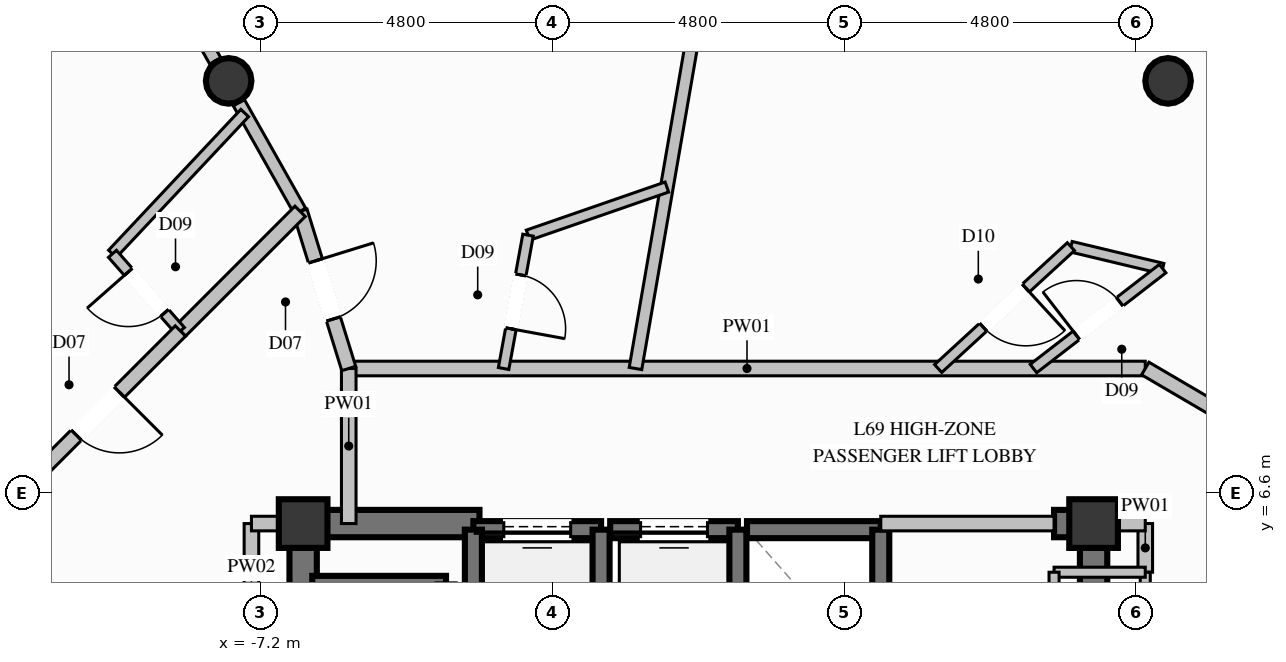
"""IFC4 building model, lengths in metres.
Left out: names, types, materials, properties, quantities, classifications, styles, units other than length and angle.
Written with IfcOpenShell. Run it as: python <this file> out.ifc"""

import sys

from ifc_helpers import new_model, si_unit, direction, frame, frame_2d, origin, origin_2d, place, context, subcontext, project, spatial, rectangle, circle, extrude, element, fill, save


model = new_model("IFC4")
c1 = context("Model", 3, precision=1e-05, world=origin(), true_north=direction((0.0, 1.0)))
c2 = subcontext(c1, "Body", "Model", "MODEL_VIEW")
j1 = project(units=[si_unit("LENGTHUNIT", "METRE"), si_unit("PLANEANGLEUNIT", "RADIAN")], contexts=[c1])
p1 = place(None, origin())
s1 = spatial("IfcSite", under=j1, at=p1, CompositionType="ELEMENT")
p2 = place(p1, origin())
s2 = spatial("IfcBuilding", under=s1, at=p2, CompositionType="ELEMENT")
p3 = place(p2, frame((0.0, 0.0, 266.8)))
s3 = spatial("IfcBuildingStorey", under=s2, at=p3, CompositionType="ELEMENT", Elevation=266.8)
for number, where, z_axis, x_axis in (
    (1, (6.5, 6.1, 0.0), (0.0, 0.0, 1.0), (1.0, 0.0, 0.0)),
    (2, (-6.5, 6.1, 0.0), (0.0, 0.0, 1.0), (1.0, 0.0, 0.0)),
):
    element("IfcColumn", number, at=place(p3, frame(where, z_axis=z_axis, x_axis=x_axis)), inside=s3, PredefinedType="COLUMN", context=c2, shape_type="SweptSolid", body=[
        extrude(rectangle(XDim=0.8, YDim=0.8, at=origin_2d()), origin(), (0.0, 0.0, 1.0), 3.8),
    ])
p4 = place(p3, frame((-6.275, 6.1, 0.0), z_axis=(0.0, 0.0, 1.0), x_axis=(1.0, 0.0, 0.0)))
e3 = element("IfcWall", 3, at=p4, inside=s3, PredefinedType="SHEAR", context=c2, shape_type="SweptSolid", body=[
    extrude(rectangle(XDim=2.675, YDim=0.45, at=frame_2d((1.337, 0.0))), origin(), (0.0, 0.0, 1.0), 3.8),
])
p5 = place(p3, frame((5.85, 6.1, 0.0), z_axis=(0.0, 0.0, 1.0), x_axis=(1.0, 0.0, 0.0)))
e4 = element("IfcWall", 4, at=p5, inside=s3, PredefinedType="SHEAR", context=c2, shape_type="SweptSolid", body=[
    extrude(rectangle(XDim=0.425, YDim=0.45, at=frame_2d((0.212, 0.0))), origin(), (0.0, 0.0, 1.0), 3.8),
])
p6 = place(p3, frame((-6.5, 2.35, 0.0), z_axis=(0.0, 0.0, 1.0), x_axis=(0.0, 1.0, 0.0)))
e5 = element("IfcWall", 5, at=p6, inside=s3, PredefinedType="SHEAR", context=c2, shape_type="SweptSolid", body=[
    extrude(rectangle(XDim=3.975, YDim=0.45, at=frame_2d((1.987, 0.0))), origin(), (0.0, 0.0, 1.0), 3.8),
])
p7 = place(p3, frame((6.5, 3.35, 0.0), z_axis=(0.0, 0.0, 1.0), x_axis=(0.0, 1.0, 0.0)))
e6 = element("IfcWall", 6, at=p7, inside=s3, PredefinedType="SHEAR", context=c2, shape_type="SweptSolid", body=[
    extrude(rectangle(XDim=2.975, YDim=0.45, at=frame_2d((1.487, 0.0))), origin(), (0.0, 0.0, 1.0), 3.8),
])
for number, where, z_axis, x_axis in (
    (7, (7.725, 13.38, 0.0), (0.0, 0.0, 1.0), (1.0, 0.0, 0.0)),
    (8, (-7.725, 13.38, 0.0), (0.0, 0.0, 1.0), (1.0, 0.0, 0.0)),
):
    element("IfcColumn", number, at=place(p3, frame(where, z_axis=z_axis, x_axis=x_axis)), inside=s3, PredefinedType="COLUMN", context=c2, shape_type="SweptSolid", body=[
        extrude(circle(Radius=0.375, at=origin_2d()), origin(), (0.0, 0.0, 1.0), 3.8),
    ])
p8 = place(p3, frame((-1.6, 6.0, 0.0), z_axis=(0.0, 0.0, 1.0), x_axis=(-1.0, 0.0, 0.0)))
e9 = element("IfcWall", 9, at=p8, inside=s3, PredefinedType="SOLIDWALL", context=c2, shape_type="SweptSolid", body=[
    extrude(rectangle(XDim=2.1, YDim=0.28, at=frame_2d((1.05, 0.0))), origin(), (0.0, 0.0, 1.0), 3.57),
])
p9 = place(p8, frame((0.5, 0.0, 0.0)))
e10 = element("IfcOpeningElement", 10, at=p9, cuts=e9, PredefinedType="OPENING", context=c2, shape_type="SweptSolid", body=[
    extrude(rectangle(XDim=1.1, YDim=2.2, at=frame_2d((0.55, 1.1))), frame((0.0, 0.15, 0.0), z_axis=(0.0, -1.0, 0.0), x_axis=(1.0, 0.0, 0.0)), (0.0, 0.0, 1.0), 0.3),
])
for number, where, z_axis, x_axis in (
    (11, (-3.7, 6.0, 0.0), (0.0, 0.0, 1.0), (0.0, -1.0, 0.0)),
    (12, (-1.6, 3.5, 0.0), (0.0, 0.0, 1.0), (0.0, 1.0, 0.0)),
):
    element("IfcWall", number, at=place(p3, frame(where, z_axis=z_axis, x_axis=x_axis)), inside=s3, PredefinedType="SOLIDWALL", context=c2, shape_type="SweptSolid", body=[
        extrude(rectangle(XDim=2.5, YDim=0.28, at=frame_2d((1.25, 0.0))), origin(), (0.0, 0.0, 1.0), 3.57),
    ])
p10 = place(p3, frame((0.65, 6.0, 0.0), z_axis=(0.0, 0.0, 1.0), x_axis=(-1.0, 0.0, 0.0)))
e13 = element("IfcWall", 13, at=p10, inside=s3, PredefinedType="SOLIDWALL", context=c2, shape_type="SweptSolid", body=[
    extrude(rectangle(XDim=2.1, YDim=0.28, at=frame_2d((1.05, 0.0))), origin(), (0.0, 0.0, 1.0), 3.57),
])
p11 = place(p10, frame((0.5, 0.0, 0.0)))
e14 = element("IfcOpeningElement", 14, at=p11, cuts=e13, PredefinedType="OPENING", context=c2, shape_type="SweptSolid", body=[
    extrude(rectangle(XDim=1.1, YDim=2.2, at=frame_2d((0.55, 1.1))), frame((0.0, 0.15, 0.0), z_axis=(0.0, -1.0, 0.0), x_axis=(1.0, 0.0, 0.0)), (0.0, 0.0, 1.0), 0.3),
])
p12 = place(p3, frame((0.65, 3.5, 0.0), z_axis=(0.0, 0.0, 1.0), x_axis=(0.0, 1.0, 0.0)))
e15 = element("IfcWall", 15, at=p12, inside=s3, PredefinedType="SOLIDWALL", context=c2, shape_type="SweptSolid", body=[
    extrude(rectangle(XDim=2.5, YDim=0.28, at=frame_2d((1.25, 0.0))), origin(), (0.0, 0.0, 1.0), 3.57),
])
p13 = place(p3, frame((3.0, 6.0, 0.0), z_axis=(0.0, 0.0, 1.0), x_axis=(-1.0, 0.0, 0.0)))
e16 = element("IfcWall", 16, at=p13, inside=s3, PredefinedType="SOLIDWALL", context=c2, shape_type="SweptSolid", body=[
    extrude(rectangle(XDim=2.2, YDim=0.28, at=frame_2d((1.1, 0.0))), origin(), (0.0, 0.0, 1.0), 3.57),
])
p14 = place(p3, frame((3.0, 3.5, 0.0), z_axis=(0.0, 0.0, 1.0), x_axis=(0.0, 1.0, 0.0)))
e17 = element("IfcWall", 17, at=p14, inside=s3, PredefinedType="SOLIDWALL", context=c2, shape_type="SweptSolid", body=[
    extrude(rectangle(XDim=2.5, YDim=0.28, at=frame_2d((1.25, 0.0))), origin(), (0.0, 0.0, 1.0), 3.57),
])
p15 = place(p3, frame((-4.15, 5.1, 0.0), z_axis=(0.0, 0.0, 1.0), x_axis=(-1.0, 0.0, 0.0)))
e18 = element("IfcWall", 18, at=p15, inside=s3, PredefinedType="SOLIDWALL", context=c2, shape_type="SweptSolid", body=[
    extrude(rectangle(XDim=2.2, YDim=0.28, at=frame_2d((1.1, 0.0))), origin(), (0.0, 0.0, 1.0), 3.57),
])
p16 = place(p3, frame((-5.75, 8.65, 0.0), z_axis=(0.0, 0.0, 1.0), x_axis=(1.0, 0.0, 0.0)))
e19 = element("IfcWall", 19, at=p16, inside=s3, PredefinedType="PARTITIONING", context=c2, shape_type="SweptSolid", body=[
    extrude(rectangle(XDim=13.1, YDim=0.24, at=frame_2d((6.55, 0.0))), origin(), (0.0, 0.0, 1.0), 3.57),
])
p17 = place(p3, frame((3.0, 6.1, 0.0), z_axis=(0.0, 0.0, 1.0), x_axis=(1.0, 0.0, 0.0)))
e20 = element("IfcWall", 20, at=p17, inside=s3, PredefinedType="PARTITIONING", context=c2, shape_type="SweptSolid", body=[
    extrude(rectangle(XDim=2.85, YDim=0.24, at=frame_2d((1.425, 0.0))), origin(), (0.0, 0.0, 1.0), 2.655),
])
p18 = place(p3, frame((7.35, 5.3, 0.0), z_axis=(0.0, 0.0, 1.0), x_axis=(0.0, 1.0, 0.0)))
e21 = element("IfcWall", 21, at=p18, inside=s3, PredefinedType="PARTITIONING", context=c2, shape_type="SweptSolid", body=[
    extrude(rectangle(XDim=0.8, YDim=0.24, at=frame_2d((0.4, 0.0))), origin(), (0.0, 0.0, 1.0), 2.655),
])
p19 = place(p3, frame((6.5, 6.1, 0.0), z_axis=(0.0, 0.0, 1.0), x_axis=(1.0, 0.0, 0.0)))
e22 = element("IfcWall", 22, at=p19, inside=s3, PredefinedType="PARTITIONING", context=c2, shape_type="SweptSolid", body=[
    extrude(rectangle(XDim=0.85, YDim=0.24, at=frame_2d((0.425, 0.0))), origin(), (0.0, 0.0, 1.0), 3.085),
])
p20 = place(p3, frame((-5.75, 6.1, 0.0), z_axis=(0.0, 0.0, 1.0), x_axis=(0.0, 1.0, 0.0)))
e23 = element("IfcWall", 23, at=p20, inside=s3, PredefinedType="PARTITIONING", context=c2, shape_type="SweptSolid", body=[
    extrude(rectangle(XDim=2.55, YDim=0.24, at=frame_2d((1.275, 0.0))), origin(), (0.0, 0.0, 1.0), 3.57),
])
p21 = place(p3, frame((-7.35, 4.95, 0.0), z_axis=(0.0, 0.0, 1.0), x_axis=(0.0, 1.0, 0.0)))
e24 = element("IfcWall", 24, at=p21, inside=s3, PredefinedType="PARTITIONING", context=c2, shape_type="SweptSolid", body=[
    extrude(rectangle(XDim=1.15, YDim=0.24, at=frame_2d((0.575, 0.0))), origin(), (0.0, 0.0, 1.0), 2.655),
])
p22 = place(p3, frame((-7.35, 6.1, 0.0), z_axis=(0.0, 0.0, 1.0), x_axis=(1.0, 0.0, 0.0)))
e25 = element("IfcWall", 25, at=p22, inside=s3, PredefinedType="PARTITIONING", context=c2, shape_type="SweptSolid", body=[
    extrude(rectangle(XDim=0.85, YDim=0.24, at=frame_2d((0.425, 0.0))), origin(), (0.0, 0.0, 1.0), 3.085),
])
p23 = place(p3, frame((7.35, 2.75, 0.0), z_axis=(0.0, 0.0, 1.0), x_axis=(0.0, 1.0, 0.0)))
e26 = element("IfcWall", 26, at=p23, inside=s3, PredefinedType="PARTITIONING", context=c2, shape_type="SweptSolid", body=[
    extrude(rectangle(XDim=2.55, YDim=0.165, at=frame_2d((1.275, 0.0))), origin(), (0.0, 0.0, 1.0), 3.57),
])
p24 = place(p23, frame((0.8, 0.0, 0.0)))
e27 = element("IfcOpeningElement", 27, at=p24, cuts=e26, PredefinedType="OPENING", context=c2, shape_type="SweptSolid", body=[
    extrude(rectangle(XDim=0.95, YDim=2.1, at=frame_2d((0.475, 1.05))), frame((0.0, 0.093, 0.0), z_axis=(0.0, -1.0, 0.0), x_axis=(1.0, 0.0, 0.0)), (0.0, 0.0, 1.0), 0.185),
])
p25 = place(p3, frame((7.35, 5.3, 0.0), z_axis=(0.0, 0.0, 1.0), x_axis=(-1.0, 0.0, 0.0)))
e28 = element("IfcWall", 28, at=p25, inside=s3, PredefinedType="PARTITIONING", context=c2, shape_type="SweptSolid", body=[
    extrude(rectangle(XDim=1.5, YDim=0.165, at=frame_2d((0.75, 0.0))), origin(), (0.0, 0.0, 1.0), 2.655),
])
p26 = place(p3, frame((5.85, 5.3, 0.0), z_axis=(0.0, 0.0, 1.0), x_axis=(0.0, -1.0, 0.0)))
e29 = element("IfcWall", 29, at=p26, inside=s3, PredefinedType="PARTITIONING", context=c2, shape_type="SweptSolid", body=[
    extrude(rectangle(XDim=2.55, YDim=0.165, at=frame_2d((1.275, 0.0))), origin(), (0.0, 0.0, 1.0), 2.655),
])
p27 = place(p3, frame((-6.55, 11.235, 0.0), z_axis=(0.0, 0.0, 1.0), x_axis=(-0.491351277928, 0.87096149265, 0.0)))
e30 = element("IfcWall", 30, at=p27, inside=s3, PredefinedType="PARTITIONING", context=c2, shape_type="SweptSolid", body=[
    extrude(rectangle(XDim=2.052, YDim=0.21, at=frame_2d((1.026, 0.0))), origin(), (0.0, 0.0, 1.0), 3.085),
])
p28 = place(p3, frame((-7.945, 13.708, 0.0), z_axis=(0.0, 0.0, 1.0), x_axis=(-0.490956426974, 0.87118412911, 0.0)))
e31 = element("IfcWall", 31, at=p28, inside=s3, PredefinedType="PARTITIONING", context=c2, shape_type="SweptSolid", body=[
    extrude(rectangle(XDim=2.617, YDim=0.21, at=frame_2d((1.309, 0.0))), origin(), (0.0, 0.0, 1.0), 3.57),
])
p29 = place(p3, frame((6.127, 10.654, 0.0), z_axis=(0.0, 0.0, 1.0), x_axis=(0.972545612194, -0.23271233788, 0.0)))
e32 = element("IfcWall", 32, at=p29, inside=s3, PredefinedType="PLUMBINGWALL", context=c2, shape_type="SweptSolid", body=[
    extrude(rectangle(XDim=1.552, YDim=0.175, at=frame_2d((0.776, 0.0))), origin(), (0.0, 0.0, 1.0), 3.57),
])
p30 = place(p3, frame((6.127, 10.654, 0.0), z_axis=(0.0, 0.0, 1.0), x_axis=(-0.736616996747, -0.676310136035, 0.0)))
e33 = element("IfcWall", 33, at=p30, inside=s3, PredefinedType="PLUMBINGWALL", context=c2, shape_type="SweptSolid", body=[
    extrude(rectangle(XDim=2.963, YDim=0.175, at=frame_2d((1.482, 0.0))), origin(), (0.0, 0.0, 1.0), 3.57),
])
p31 = place(p30, frame((1.007, 0.0, 0.0)))
e34 = element("IfcOpeningElement", 34, at=p31, cuts=e33, PredefinedType="OPENING", context=c2, shape_type="SweptSolid", body=[
    extrude(rectangle(XDim=0.95, YDim=2.1, at=frame_2d((0.475, 1.05))), frame((0.0, 0.098, 0.0), z_axis=(0.0, -1.0, 0.0), x_axis=(1.0, 0.0, 0.0)), (0.0, 0.0, 1.0), 0.195),
])
p32 = place(p3, frame((5.511, 8.65, 0.0), z_axis=(0.0, 0.0, 1.0), x_axis=(0.791101070426, 0.611685455419, 0.0)))
e35 = element("IfcWall", 35, at=p32, inside=s3, PredefinedType="PLUMBINGWALL", context=c2, shape_type="SweptSolid", body=[
    extrude(rectangle(XDim=2.686, YDim=0.175, at=frame_2d((1.343, 0.0))), origin(), (0.0, 0.0, 1.0), 3.57),
])
p33 = place(p32, frame((0.893, 0.0, 0.0)))
e36 = element("IfcOpeningElement", 36, at=p33, cuts=e35, PredefinedType="OPENING", context=c2, shape_type="SweptSolid", body=[
    extrude(rectangle(XDim=0.9, YDim=2.1, at=frame_2d((0.45, 1.05))), frame((0.0, 0.098, 0.0), z_axis=(0.0, -1.0, 0.0), x_axis=(1.0, 0.0, 0.0)), (0.0, 0.0, 1.0), 0.195),
])
p34 = place(p3, frame((7.35, 8.65, 0.0), z_axis=(0.0, 0.0, 1.0), x_axis=(0.862873842462, -0.505419362505, 0.0)))
e37 = element("IfcWall", 37, at=p34, inside=s3, PredefinedType="PARTITIONING", context=c2, shape_type="SweptSolid", body=[
    extrude(rectangle(XDim=4.155, YDim=0.24, at=frame_2d((2.077, 0.0))), origin(), (0.0, 0.0, 1.0), 3.57),
])
p35 = place(p34, frame((1.577, 0.0, 0.0)))
e38 = element("IfcOpeningElement", 38, at=p35, cuts=e37, PredefinedType="OPENING", context=c2, shape_type="SweptSolid", body=[
    extrude(rectangle(XDim=1.0, YDim=2.2, at=frame_2d((0.5, 1.1))), frame((0.0, 0.13, 0.0), z_axis=(0.0, -1.0, 0.0), x_axis=(1.0, 0.0, 0.0)), (0.0, 0.0, 1.0), 0.26),
])
p36 = place(p3, frame((-1.034, 8.65, 0.0), z_axis=(0.0, 0.0, 1.0), x_axis=(0.170406932978, 0.985373775373, 0.0)))
e39 = element("IfcWall", 39, at=p36, inside=s3, PredefinedType="PARTITIONING", context=c2, shape_type="SweptSolid", body=[
    extrude(rectangle(XDim=6.507, YDim=0.21, at=frame_2d((3.254, 0.0))), origin(), (0.0, 0.0, 1.0), 3.57),
])
p37 = place(p3, frame((-2.801, 10.843, 0.0), z_axis=(0.0, 0.0, 1.0), x_axis=(0.944888722347, 0.327391665106, 0.0)))
e40 = element("IfcWall", 40, at=p37, inside=s3, PredefinedType="PLUMBINGWALL", context=c2, shape_type="SweptSolid", body=[
    extrude(rectangle(XDim=2.416, YDim=0.175, at=frame_2d((1.208, 0.0))), origin(), (0.0, 0.0, 1.0), 3.57),
])
p38 = place(p3, frame((-2.801, 10.843, 0.0), z_axis=(0.0, 0.0, 1.0), x_axis=(-0.180234289761, -0.983623708943, 0.0)))
e41 = element("IfcWall", 41, at=p38, inside=s3, PredefinedType="PLUMBINGWALL", context=c2, shape_type="SweptSolid", body=[
    extrude(rectangle(XDim=2.23, YDim=0.175, at=frame_2d((1.115, 0.0))), origin(), (0.0, 0.0, 1.0), 3.57),
])
p39 = place(p38, frame((0.665, 0.0, 0.0)))
e42 = element("IfcOpeningElement", 42, at=p39, cuts=e41, PredefinedType="OPENING", context=c2, shape_type="SweptSolid", body=[
    extrude(rectangle(XDim=0.9, YDim=2.1, at=frame_2d((0.45, 1.05))), frame((0.0, 0.098, 0.0), z_axis=(0.0, -1.0, 0.0), x_axis=(1.0, 0.0, 0.0)), (0.0, 0.0, 1.0), 0.195),
])
p40 = place(p3, frame((-6.55, 11.235, 0.0), z_axis=(0.0, 0.0, 1.0), x_axis=(0.295638642954, -0.955299844443, 0.0)))
e43 = element("IfcWall", 43, at=p40, inside=s3, PredefinedType="PARTITIONING", context=c2, shape_type="SweptSolid", body=[
    extrude(rectangle(XDim=2.706, YDim=0.24, at=frame_2d((1.353, 0.0))), origin(), (0.0, 0.0, 1.0), 3.57),
])
p41 = place(p40, frame((0.853, 0.0, 0.0)))
e44 = element("IfcOpeningElement", 44, at=p41, cuts=e43, PredefinedType="OPENING", context=c2, shape_type="SweptSolid", body=[
    extrude(rectangle(XDim=1.0, YDim=2.2, at=frame_2d((0.5, 1.1))), frame((0.0, 0.13, 0.0), z_axis=(0.0, -1.0, 0.0), x_axis=(1.0, 0.0, 0.0)), (0.0, 0.0, 1.0), 0.26),
])
p42 = place(p3, frame((-6.55, 11.235, 0.0), z_axis=(0.0, 0.0, 1.0), x_axis=(-0.707106781187, -0.707106781187, 0.0)))
e45 = element("IfcWall", 45, at=p42, inside=s3, PredefinedType="PARTITIONING", context=c2, shape_type="SweptSolid", body=[
    extrude(rectangle(XDim=2.783, YDim=0.24, at=frame_2d((1.392, 0.0))), origin(), (0.0, 0.0, 1.0), 3.57),
])
p43 = place(p3, frame((-7.461, 12.851, 0.0), z_axis=(0.0, 0.0, 1.0), x_axis=(-0.684705153541, -0.728820178586, 0.0)))
e46 = element("IfcWall", 46, at=p43, inside=s3, PredefinedType="PLUMBINGWALL", context=c2, shape_type="SweptSolid", body=[
    extrude(rectangle(XDim=3.177, YDim=0.175, at=frame_2d((1.588, 0.0))), origin(), (0.0, 0.0, 1.0), 3.137),
])
p44 = place(p3, frame((-8.518, 9.267, 0.0), z_axis=(0.0, 0.0, 1.0), x_axis=(-0.661086668584, 0.750309547201, 0.0)))
e47 = element("IfcWall", 47, at=p44, inside=s3, PredefinedType="PLUMBINGWALL", context=c2, shape_type="SweptSolid", body=[
    extrude(rectangle(XDim=1.691, YDim=0.175, at=frame_2d((0.845, 0.0))), origin(), (0.0, 0.0, 1.0), 3.57),
])
p45 = place(p44, frame((0.396, 0.0, 0.0)))
e48 = element("IfcOpeningElement", 48, at=p45, cuts=e47, PredefinedType="OPENING", context=c2, shape_type="SweptSolid", body=[
    extrude(rectangle(XDim=0.9, YDim=2.1, at=frame_2d((0.45, 1.05))), frame((0.0, 0.098, 0.0), z_axis=(0.0, -1.0, 0.0), x_axis=(1.0, 0.0, 0.0)), (0.0, 0.0, 1.0), 0.195),
])
p46 = place(p3, frame((-8.518, 9.267, 0.0), z_axis=(0.0, 0.0, 1.0), x_axis=(-0.707106781187, -0.707106781187, 0.0)))
e49 = element("IfcWall", 49, at=p46, inside=s3, PredefinedType="PARTITIONING", context=c2, shape_type="SweptSolid", body=[
    extrude(rectangle(XDim=3.843, YDim=0.24, at=frame_2d((1.921, 0.0))), origin(), (0.0, 0.0, 1.0), 3.57),
])
p47 = place(p46, frame((1.421, 0.0, 0.0)))
e50 = element("IfcOpeningElement", 50, at=p47, cuts=e49, PredefinedType="OPENING", context=c2, shape_type="SweptSolid", body=[
    extrude(rectangle(XDim=1.0, YDim=2.2, at=frame_2d((0.5, 1.1))), frame((0.0, 0.13, 0.0), z_axis=(0.0, -1.0, 0.0), x_axis=(1.0, 0.0, 0.0)), (0.0, 0.0, 1.0), 0.26),
])
p48 = place(p9, origin())
e51 = element("IfcDoor", 51, at=p48, inside=s3, OperationType="SLIDING_TO_LEFT", PredefinedType="DOOR", context=c2, shape_type="SweptSolid", body=[
    extrude(rectangle(XDim=1.1, YDim=2.2, at=frame_2d((0.55, 1.1))), frame((0.0, 0.025, 0.0), z_axis=(0.0, -1.0, 0.0), x_axis=(1.0, 0.0, 0.0)), (0.0, 0.0, 1.0), 0.05),
])
fill(e10, e51)
p49 = place(p11, origin())
e52 = element("IfcDoor", 52, at=p49, inside=s3, OperationType="SLIDING_TO_LEFT", PredefinedType="DOOR", context=c2, shape_type="SweptSolid", body=[
    extrude(rectangle(XDim=1.1, YDim=2.2, at=frame_2d((0.55, 1.1))), frame((0.0, 0.025, 0.0), z_axis=(0.0, -1.0, 0.0), x_axis=(1.0, 0.0, 0.0)), (0.0, 0.0, 1.0), 0.05),
])
fill(e14, e52)
p50 = place(p33, origin())
e53 = element("IfcDoor", 53, at=p50, inside=s3, OperationType="SINGLE_SWING_LEFT", PredefinedType="DOOR", context=c2, shape_type="SweptSolid", body=[
    extrude(rectangle(XDim=0.9, YDim=2.1, at=frame_2d((0.45, 1.05))), frame((0.0, 0.025, 0.0), z_axis=(0.0, -1.0, 0.0), x_axis=(1.0, 0.0, 0.0)), (0.0, 0.0, 1.0), 0.05),
])
fill(e36, e53)
p51 = place(p31, origin())
e54 = element("IfcDoor", 54, at=p51, inside=s3, OperationType="SINGLE_SWING_LEFT", PredefinedType="DOOR", context=c2, shape_type="SweptSolid", body=[
    extrude(rectangle(XDim=0.95, YDim=2.1, at=frame_2d((0.475, 1.05))), frame((0.0, 0.025, 0.0), z_axis=(0.0, -1.0, 0.0), x_axis=(1.0, 0.0, 0.0)), (0.0, 0.0, 1.0), 0.05),
])
fill(e34, e54)
p52 = place(p39, origin())
e55 = element("IfcDoor", 55, at=p52, inside=s3, OperationType="SINGLE_SWING_RIGHT", PredefinedType="DOOR", context=c2, shape_type="SweptSolid", body=[
    extrude(rectangle(XDim=0.9, YDim=2.1, at=frame_2d((0.45, 1.05))), frame((0.0, 0.025, 0.0), z_axis=(0.0, -1.0, 0.0), x_axis=(1.0, 0.0, 0.0)), (0.0, 0.0, 1.0), 0.05),
])
fill(e42, e55)
p53 = place(p41, origin())
e56 = element("IfcDoor", 56, at=p53, inside=s3, OperationType="SINGLE_SWING_LEFT", PredefinedType="DOOR", context=c2, shape_type="SweptSolid", body=[
    extrude(rectangle(XDim=1.0, YDim=2.2, at=frame_2d((0.5, 1.1))), frame((0.0, 0.025, 0.0), z_axis=(0.0, -1.0, 0.0), x_axis=(1.0, 0.0, 0.0)), (0.0, 0.0, 1.0), 0.05),
])
fill(e44, e56)
p54 = place(p45, origin())
e57 = element("IfcDoor", 57, at=p54, inside=s3, OperationType="SINGLE_SWING_RIGHT", PredefinedType="DOOR", context=c2, shape_type="SweptSolid", body=[
    extrude(rectangle(XDim=0.9, YDim=2.1, at=frame_2d((0.45, 1.05))), frame((0.0, 0.025, 0.0), z_axis=(0.0, -1.0, 0.0), x_axis=(1.0, 0.0, 0.0)), (0.0, 0.0, 1.0), 0.05),
])
fill(e48, e57)
p55 = place(p47, origin())
e58 = element("IfcDoor", 58, at=p55, inside=s3, OperationType="SINGLE_SWING_LEFT", PredefinedType="DOOR", context=c2, shape_type="SweptSolid", body=[
    extrude(rectangle(XDim=1.0, YDim=2.2, at=frame_2d((0.5, 1.1))), frame((0.0, 0.025, 0.0), z_axis=(0.0, -1.0, 0.0), x_axis=(1.0, 0.0, 0.0)), (0.0, 0.0, 1.0), 0.05),
])
fill(e50, e58)
save(model, sys.argv[1])
